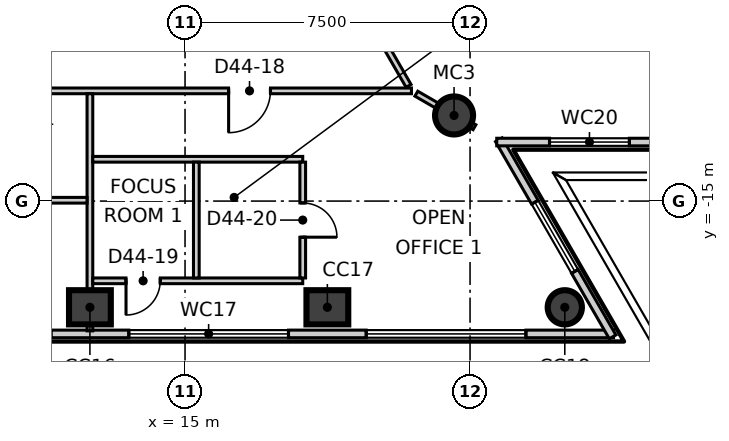
"""IFC4 building model, lengths in metres.
Left out: names, types, materials, properties, quantities, classifications, styles, units other than length and angle.
Written with IfcOpenShell. Run it as: python <this file> out.ifc"""

import sys

from ifc_helpers import new_model, si_unit, direction, frame, frame_2d, origin, origin_2d, place, context, subcontext, project, spatial, rectangle, circle, extrude, element, fill, save


model = new_model("IFC4")
c1 = context("Model", 3, precision=1e-05, world=origin(), true_north=direction((0.0, 1.0)))
c2 = subcontext(c1, "Body", "Model", "MODEL_VIEW")
j1 = project(units=[si_unit("LENGTHUNIT", "METRE"), si_unit("PLANEANGLEUNIT", "RADIAN")], contexts=[c1])
p1 = place(None, origin())
s1 = spatial("IfcSite", under=j1, at=p1, CompositionType="ELEMENT")
p2 = place(p1, origin())
s2 = spatial("IfcBuilding", under=s1, at=p2, CompositionType="ELEMENT")
p3 = place(p2, frame((0.0, 0.0, 191.3)))
s3 = spatial("IfcBuildingStorey", under=s2, at=p3, CompositionType="ELEMENT", Elevation=191.3)
for number, where, z_axis, x_axis in (
    (1, (12.497, -17.795, -0.3), (0.0, 0.0, 1.0), (1.0, 0.0, 0.0)),
    (2, (18.745, -17.795, -0.3), (0.0, 0.0, 1.0), (1.0, 0.0, 0.0)),
):
    element("IfcColumn", number, at=place(p3, frame(where, z_axis=z_axis, x_axis=x_axis)), inside=s3, PredefinedType="COLUMN", context=c2, shape_type="SweptSolid", body=[
        extrude(rectangle(XDim=1.1, YDim=0.9, at=origin_2d()), origin(), (0.0, 0.0, 1.0), 4.0),
    ])
p4 = place(p3, frame((24.993, -17.795, -0.3), z_axis=(0.0, 0.0, 1.0), x_axis=(1.0, 0.0, 0.0)))
e3 = element("IfcColumn", 3, at=p4, inside=s3, PredefinedType="COLUMN", context=c2, shape_type="SweptSolid", body=[
    extrude(circle(Radius=0.45, at=origin_2d()), origin(), (0.0, 0.0, 1.0), 4.0),
])
p5 = place(p3, frame((22.079, -12.747, -0.3), z_axis=(0.0, 0.0, 1.0), x_axis=(1.0, 0.0, 0.0)))
e4 = element("IfcColumn", 4, at=p5, inside=s3, PredefinedType="COLUMN", context=c2, shape_type="SweptSolid", body=[
    extrude(circle(Radius=0.5, at=origin_2d()), origin(), (0.0, 0.0, 1.0), 4.0),
])
p6 = place(p3, frame((-26.296, -18.495, 0.0), z_axis=(0.0, 0.0, 1.0), x_axis=(1.0, 0.0, 0.0)))
e5 = element("IfcWall", 5, at=p6, inside=s3, PredefinedType="ELEMENTEDWALL", context=c2, shape_type="SweptSolid", body=[
    extrude(rectangle(XDim=52.572, YDim=0.2, at=frame_2d((26.286, 0.0))), origin(), (0.0, 0.0, 1.0), 3.7),
])
p7 = place(p6, frame((2.327, 0.0, 0.9)))
e6 = element("IfcOpeningElement", 6, at=p7, cuts=e5, PredefinedType="OPENING", context=c2, shape_type="SweptSolid", body=[
    extrude(rectangle(XDim=4.2, YDim=2.5, at=frame_2d((2.1, 1.25))), frame((0.0, 0.11, 0.0), z_axis=(0.0, -1.0, 0.0), x_axis=(1.0, 0.0, 0.0)), (0.0, 0.0, 1.0), 0.22),
])
p8 = place(p6, frame((8.575, 0.0, 0.9)))
e7 = element("IfcOpeningElement", 7, at=p8, cuts=e5, PredefinedType="OPENING", context=c2, shape_type="SweptSolid", body=[
    extrude(rectangle(XDim=4.2, YDim=2.5, at=frame_2d((2.1, 1.25))), frame((0.0, 0.11, 0.0), z_axis=(0.0, -1.0, 0.0), x_axis=(1.0, 0.0, 0.0)), (0.0, 0.0, 1.0), 0.22),
])
p9 = place(p6, frame((14.824, 0.0, 0.9)))
e8 = element("IfcOpeningElement", 8, at=p9, cuts=e5, PredefinedType="OPENING", context=c2, shape_type="SweptSolid", body=[
    extrude(rectangle(XDim=4.2, YDim=2.5, at=frame_2d((2.1, 1.25))), frame((0.0, 0.11, 0.0), z_axis=(0.0, -1.0, 0.0), x_axis=(1.0, 0.0, 0.0)), (0.0, 0.0, 1.0), 0.22),
])
p10 = place(p6, frame((21.072, 0.0, 0.9)))
e9 = element("IfcOpeningElement", 9, at=p10, cuts=e5, PredefinedType="OPENING", context=c2, shape_type="SweptSolid", body=[
    extrude(rectangle(XDim=4.2, YDim=2.5, at=frame_2d((2.1, 1.25))), frame((0.0, 0.11, 0.0), z_axis=(0.0, -1.0, 0.0), x_axis=(1.0, 0.0, 0.0)), (0.0, 0.0, 1.0), 0.22),
])
p11 = place(p6, frame((27.32, 0.0, 0.9)))
e10 = element("IfcOpeningElement", 10, at=p11, cuts=e5, PredefinedType="OPENING", context=c2, shape_type="SweptSolid", body=[
    extrude(rectangle(XDim=4.2, YDim=2.5, at=frame_2d((2.1, 1.25))), frame((0.0, 0.11, 0.0), z_axis=(0.0, -1.0, 0.0), x_axis=(1.0, 0.0, 0.0)), (0.0, 0.0, 1.0), 0.22),
])
p12 = place(p6, frame((33.568, 0.0, 0.9)))
e11 = element("IfcOpeningElement", 11, at=p12, cuts=e5, PredefinedType="OPENING", context=c2, shape_type="SweptSolid", body=[
    extrude(rectangle(XDim=4.2, YDim=2.5, at=frame_2d((2.1, 1.25))), frame((0.0, 0.11, 0.0), z_axis=(0.0, -1.0, 0.0), x_axis=(1.0, 0.0, 0.0)), (0.0, 0.0, 1.0), 0.22),
])
p13 = place(p6, frame((39.817, 0.0, 0.9)))
e12 = element("IfcOpeningElement", 12, at=p13, cuts=e5, PredefinedType="OPENING", context=c2, shape_type="SweptSolid", body=[
    extrude(rectangle(XDim=4.2, YDim=2.5, at=frame_2d((2.1, 1.25))), frame((0.0, 0.11, 0.0), z_axis=(0.0, -1.0, 0.0), x_axis=(1.0, 0.0, 0.0)), (0.0, 0.0, 1.0), 0.22),
])
p14 = place(p6, frame((46.065, 0.0, 0.9)))
e13 = element("IfcOpeningElement", 13, at=p14, cuts=e5, PredefinedType="OPENING", context=c2, shape_type="SweptSolid", body=[
    extrude(rectangle(XDim=4.2, YDim=2.5, at=frame_2d((2.1, 1.25))), frame((0.0, 0.11, 0.0), z_axis=(0.0, -1.0, 0.0), x_axis=(1.0, 0.0, 0.0)), (0.0, 0.0, 1.0), 0.22),
])
p15 = place(p3, frame((26.251, -18.573, 0.0), z_axis=(0.0, 0.0, 1.0), x_axis=(-0.499896541353, 0.866085127423, 0.0)))
e14 = element("IfcWall", 14, at=p15, inside=s3, PredefinedType="ELEMENTEDWALL", context=c2, shape_type="SweptSolid", body=[
    extrude(rectangle(XDim=5.989, YDim=0.2, at=frame_2d((2.995, 0.0))), origin(), (0.0, 0.0, 1.0), 3.7),
])
p16 = place(p15, frame((1.99, 0.0, 0.9)))
e15 = element("IfcOpeningElement", 15, at=p16, cuts=e14, PredefinedType="OPENING", context=c2, shape_type="SweptSolid", body=[
    extrude(rectangle(XDim=2.1, YDim=2.5, at=frame_2d((1.05, 1.25))), frame((0.0, 0.11, 0.0), z_axis=(0.0, -1.0, 0.0), x_axis=(1.0, 0.0, 0.0)), (0.0, 0.0, 1.0), 0.22),
])
p17 = place(p3, frame((23.202, -13.447, 0.0), z_axis=(0.0, 0.0, 1.0), x_axis=(1.0, 0.0, 0.0)))
e16 = element("IfcWall", 16, at=p17, inside=s3, PredefinedType="ELEMENTEDWALL", context=c2, shape_type="SweptSolid", body=[
    extrude(rectangle(XDim=5.988, YDim=0.2, at=frame_2d((2.994, 0.0))), origin(), (0.0, 0.0, 1.0), 3.7),
])
p18 = place(p17, frame((1.39, 0.0, 0.9)))
e17 = element("IfcOpeningElement", 17, at=p18, cuts=e16, PredefinedType="OPENING", context=c2, shape_type="SweptSolid", body=[
    extrude(rectangle(XDim=2.1, YDim=2.5, at=frame_2d((1.05, 1.25))), frame((0.0, 0.11, 0.0), z_axis=(0.0, -1.0, 0.0), x_axis=(1.0, 0.0, 0.0)), (0.0, 0.0, 1.0), 0.22),
])
p19 = place(p3, frame((29.165, -13.525, 0.0), z_axis=(0.0, 0.0, 1.0), x_axis=(-0.500008941164, 0.86602024154, 0.0)))
e18 = element("IfcWall", 18, at=p19, inside=s3, PredefinedType="ELEMENTEDWALL", context=c2, shape_type="SweptSolid", body=[
    extrude(rectangle(XDim=52.571, YDim=0.2, at=frame_2d((26.286, 0.0))), origin(), (0.0, 0.0, 1.0), 3.7),
])
p20 = place(p19, frame((2.327, 0.0, 0.9)))
e19 = element("IfcOpeningElement", 19, at=p20, cuts=e18, PredefinedType="OPENING", context=c2, shape_type="SweptSolid", body=[
    extrude(rectangle(XDim=4.2, YDim=2.5, at=frame_2d((2.1, 1.25))), frame((0.0, 0.11, 0.0), z_axis=(0.0, -1.0, 0.0), x_axis=(1.0, 0.0, 0.0)), (0.0, 0.0, 1.0), 0.22),
])
p21 = place(p19, frame((8.575, 0.0, 0.9)))
e20 = element("IfcOpeningElement", 20, at=p21, cuts=e18, PredefinedType="OPENING", context=c2, shape_type="SweptSolid", body=[
    extrude(rectangle(XDim=4.2, YDim=2.5, at=frame_2d((2.1, 1.25))), frame((0.0, 0.11, 0.0), z_axis=(0.0, -1.0, 0.0), x_axis=(1.0, 0.0, 0.0)), (0.0, 0.0, 1.0), 0.22),
])
p22 = place(p19, frame((14.823, 0.0, 0.9)))
e21 = element("IfcOpeningElement", 21, at=p22, cuts=e18, PredefinedType="OPENING", context=c2, shape_type="SweptSolid", body=[
    extrude(rectangle(XDim=4.2, YDim=2.5, at=frame_2d((2.1, 1.25))), frame((0.0, 0.11, 0.0), z_axis=(0.0, -1.0, 0.0), x_axis=(1.0, 0.0, 0.0)), (0.0, 0.0, 1.0), 0.22),
])
p23 = place(p19, frame((21.072, 0.0, 0.9)))
e22 = element("IfcOpeningElement", 22, at=p23, cuts=e18, PredefinedType="OPENING", context=c2, shape_type="SweptSolid", body=[
    extrude(rectangle(XDim=4.2, YDim=2.5, at=frame_2d((2.1, 1.25))), frame((0.0, 0.11, 0.0), z_axis=(0.0, -1.0, 0.0), x_axis=(1.0, 0.0, 0.0)), (0.0, 0.0, 1.0), 0.22),
])
p24 = place(p19, frame((27.32, 0.0, 0.9)))
e23 = element("IfcOpeningElement", 23, at=p24, cuts=e18, PredefinedType="OPENING", context=c2, shape_type="SweptSolid", body=[
    extrude(rectangle(XDim=4.2, YDim=2.5, at=frame_2d((2.1, 1.25))), frame((0.0, 0.11, 0.0), z_axis=(0.0, -1.0, 0.0), x_axis=(1.0, 0.0, 0.0)), (0.0, 0.0, 1.0), 0.22),
])
p25 = place(p19, frame((33.568, 0.0, 0.9)))
e24 = element("IfcOpeningElement", 24, at=p25, cuts=e18, PredefinedType="OPENING", context=c2, shape_type="SweptSolid", body=[
    extrude(rectangle(XDim=4.2, YDim=2.5, at=frame_2d((2.1, 1.25))), frame((0.0, 0.11, 0.0), z_axis=(0.0, -1.0, 0.0), x_axis=(1.0, 0.0, 0.0)), (0.0, 0.0, 1.0), 0.22),
])
p26 = place(p19, frame((39.816, 0.0, 0.9)))
e25 = element("IfcOpeningElement", 25, at=p26, cuts=e18, PredefinedType="OPENING", context=c2, shape_type="SweptSolid", body=[
    extrude(rectangle(XDim=4.2, YDim=2.5, at=frame_2d((2.1, 1.25))), frame((0.0, 0.11, 0.0), z_axis=(0.0, -1.0, 0.0), x_axis=(1.0, 0.0, 0.0)), (0.0, 0.0, 1.0), 0.22),
])
p27 = place(p19, frame((46.064, 0.0, 0.9)))
e26 = element("IfcOpeningElement", 26, at=p27, cuts=e18, PredefinedType="OPENING", context=c2, shape_type="SweptSolid", body=[
    extrude(rectangle(XDim=4.2, YDim=2.5, at=frame_2d((2.1, 1.25))), frame((0.0, 0.11, 0.0), z_axis=(0.0, -1.0, 0.0), x_axis=(1.0, 0.0, 0.0)), (0.0, 0.0, 1.0), 0.22),
])
p28 = place(p3, frame((-20.808, -12.1, 0.0), z_axis=(0.0, 0.0, 1.0), x_axis=(1.0, 0.0, 0.0)))
e27 = element("IfcWall", 27, at=p28, inside=s3, PredefinedType="PARTITIONING", context=c2, shape_type="SweptSolid", body=[
    extrude(rectangle(XDim=41.766, YDim=0.15, at=frame_2d((20.883, 0.0))), origin(), (0.0, 0.0, 1.0), 3.7),
])
p29 = place(p28, frame((3.5, 0.0, 0.0)))
e28 = element("IfcOpeningElement", 28, at=p29, cuts=e27, PredefinedType="OPENING", context=c2, shape_type="SweptSolid", body=[
    extrude(rectangle(XDim=1.1, YDim=2.1, at=frame_2d((0.55, 1.05))), frame((0.0, 0.085, 0.0), z_axis=(0.0, -1.0, 0.0), x_axis=(1.0, 0.0, 0.0)), (0.0, 0.0, 1.0), 0.17),
])
p30 = place(p28, frame((18.362, 0.0, 0.0)))
e29 = element("IfcOpeningElement", 29, at=p30, cuts=e27, PredefinedType="OPENING", context=c2, shape_type="SweptSolid", body=[
    extrude(rectangle(XDim=1.1, YDim=2.1, at=frame_2d((0.55, 1.05))), frame((0.0, 0.085, 0.0), z_axis=(0.0, -1.0, 0.0), x_axis=(1.0, 0.0, 0.0)), (0.0, 0.0, 1.0), 0.17),
])
p31 = place(p28, frame((9.462, 0.0, 0.0)))
e30 = element("IfcOpeningElement", 30, at=p31, cuts=e27, PredefinedType="OPENING", context=c2, shape_type="SweptSolid", body=[
    extrude(rectangle(XDim=0.9, YDim=2.1, at=frame_2d((0.45, 1.05))), frame((0.0, 0.085, 0.0), z_axis=(0.0, -1.0, 0.0), x_axis=(1.0, 0.0, 0.0)), (0.0, 0.0, 1.0), 0.17),
])
p32 = place(p28, frame((12.662, 0.0, 0.0)))
e31 = element("IfcOpeningElement", 31, at=p32, cuts=e27, PredefinedType="OPENING", context=c2, shape_type="SweptSolid", body=[
    extrude(rectangle(XDim=0.9, YDim=2.1, at=frame_2d((0.45, 1.05))), frame((0.0, 0.085, 0.0), z_axis=(0.0, -1.0, 0.0), x_axis=(1.0, 0.0, 0.0)), (0.0, 0.0, 1.0), 0.17),
])
p33 = place(p28, frame((15.362, 0.0, 0.0)))
e32 = element("IfcOpeningElement", 32, at=p33, cuts=e27, PredefinedType="OPENING", context=c2, shape_type="SweptSolid", body=[
    extrude(rectangle(XDim=1.0, YDim=2.1, at=frame_2d((0.5, 1.05))), frame((0.0, 0.085, 0.0), z_axis=(0.0, -1.0, 0.0), x_axis=(1.0, 0.0, 0.0)), (0.0, 0.0, 1.0), 0.17),
])
p34 = place(p28, frame((26.458, 0.0, 0.0)))
e33 = element("IfcOpeningElement", 33, at=p34, cuts=e27, PredefinedType="OPENING", context=c2, shape_type="SweptSolid", body=[
    extrude(rectangle(XDim=1.1, YDim=2.1, at=frame_2d((0.55, 1.05))), frame((0.0, 0.085, 0.0), z_axis=(0.0, -1.0, 0.0), x_axis=(1.0, 0.0, 0.0)), (0.0, 0.0, 1.0), 0.17),
])
p35 = place(p28, frame((36.955, 0.0, 0.0)))
e34 = element("IfcOpeningElement", 34, at=p35, cuts=e27, PredefinedType="OPENING", context=c2, shape_type="SweptSolid", body=[
    extrude(rectangle(XDim=1.1, YDim=2.1, at=frame_2d((0.55, 1.05))), frame((0.0, 0.085, 0.0), z_axis=(0.0, -1.0, 0.0), x_axis=(1.0, 0.0, 0.0)), (0.0, 0.0, 1.0), 0.17),
])
p36 = place(p3, frame((21.087, -12.174, 0.0), z_axis=(0.0, 0.0, 1.0), x_axis=(0.866022094817, -0.500005731256, 0.0)))
e35 = element("IfcWall", 35, at=p36, inside=s3, PredefinedType="PARTITIONING", context=c2, shape_type="SweptSolid", body=[
    extrude(rectangle(XDim=1.766, YDim=0.15, at=frame_2d((0.883, 0.0))), origin(), (0.0, 0.0, 1.0), 3.2),
])
p37 = place(p3, frame((0.075, 24.07, 0.0), z_axis=(0.0, 0.0, 1.0), x_axis=(0.49999939571, -0.866025752671, 0.0)))
e36 = element("IfcWall", 36, at=p37, inside=s3, PredefinedType="PARTITIONING", context=c2, shape_type="SweptSolid", body=[
    extrude(rectangle(XDim=41.614, YDim=0.15, at=frame_2d((20.807, 0.0))), origin(), (0.0, 0.0, 1.0), 3.7),
])
p38 = place(p37, frame((37.015, 0.0, 0.0)))
e37 = element("IfcOpeningElement", 37, at=p38, cuts=e36, PredefinedType="OPENING", context=c2, shape_type="SweptSolid", body=[
    extrude(rectangle(XDim=1.1, YDim=2.1, at=frame_2d((0.55, 1.05))), frame((0.0, 0.085, 0.0), z_axis=(0.0, -1.0, 0.0), x_axis=(1.0, 0.0, 0.0)), (0.0, 0.0, 1.0), 0.17),
])
p39 = place(p37, frame((25.154, 0.0, 0.0)))
e38 = element("IfcOpeningElement", 38, at=p39, cuts=e36, PredefinedType="OPENING", context=c2, shape_type="SweptSolid", body=[
    extrude(rectangle(XDim=1.0, YDim=2.1, at=frame_2d((0.5, 1.05))), frame((0.0, 0.085, 0.0), z_axis=(0.0, -1.0, 0.0), x_axis=(1.0, 0.0, 0.0)), (0.0, 0.0, 1.0), 0.17),
])
p40 = place(p37, frame((31.454, 0.0, 0.0)))
e39 = element("IfcOpeningElement", 39, at=p40, cuts=e36, PredefinedType="OPENING", context=c2, shape_type="SweptSolid", body=[
    extrude(rectangle(XDim=0.9, YDim=2.1, at=frame_2d((0.45, 1.05))), frame((0.0, 0.085, 0.0), z_axis=(0.0, -1.0, 0.0), x_axis=(1.0, 0.0, 0.0)), (0.0, 0.0, 1.0), 0.17),
])
p41 = place(p37, frame((17.157, 0.0, 0.0)))
e40 = element("IfcOpeningElement", 40, at=p41, cuts=e36, PredefinedType="OPENING", context=c2, shape_type="SweptSolid", body=[
    extrude(rectangle(XDim=1.0, YDim=2.1, at=frame_2d((0.5, 1.05))), frame((0.0, 0.085, 0.0), z_axis=(0.0, -1.0, 0.0), x_axis=(1.0, 0.0, 0.0)), (0.0, 0.0, 1.0), 0.17),
])
p42 = place(p37, frame((6.609, 0.0, 0.0)))
e41 = element("IfcOpeningElement", 41, at=p42, cuts=e36, PredefinedType="OPENING", context=c2, shape_type="SweptSolid", body=[
    extrude(rectangle(XDim=1.1, YDim=2.1, at=frame_2d((0.55, 1.05))), frame((0.0, 0.085, 0.0), z_axis=(0.0, -1.0, 0.0), x_axis=(1.0, 0.0, 0.0)), (0.0, 0.0, 1.0), 0.17),
])
p43 = place(p3, frame((12.497, -18.415, 0.0), z_axis=(0.0, 0.0, 1.0), x_axis=(0.0, 1.0, 0.0)))
e42 = element("IfcWall", 42, at=p43, inside=s3, PredefinedType="PARTITIONING", context=c2, shape_type="SweptSolid", body=[
    extrude(rectangle(XDim=6.24, YDim=0.15, at=frame_2d((3.12, 0.0))), origin(), (0.0, 0.0, 1.0), 3.7),
])
p44 = place(p3, frame((0.075, -14.978, 0.0), z_axis=(0.0, 0.0, 1.0), x_axis=(1.0, 0.0, 0.0)))
e43 = element("IfcWall", 43, at=p44, inside=s3, PredefinedType="PARTITIONING", context=c2, shape_type="SweptSolid", body=[
    extrude(rectangle(XDim=12.347, YDim=0.15, at=frame_2d((6.174, 0.0))), origin(), (0.0, 0.0, 1.0), 3.7),
])
p45 = place(p44, frame((5.675, 0.0, 0.0)))
e44 = element("IfcOpeningElement", 44, at=p45, cuts=e43, PredefinedType="OPENING", context=c2, shape_type="SweptSolid", body=[
    extrude(rectangle(XDim=1.0, YDim=2.1, at=frame_2d((0.5, 1.05))), frame((0.0, 0.085, 0.0), z_axis=(0.0, -1.0, 0.0), x_axis=(1.0, 0.0, 0.0)), (0.0, 0.0, 1.0), 0.17),
])
p46 = place(p3, frame((12.572, -17.098, 0.0), z_axis=(0.0, 0.0, 1.0), x_axis=(1.0, 0.0, 0.0)))
e45 = element("IfcWall", 45, at=p46, inside=s3, PredefinedType="PARTITIONING", context=c2, shape_type="SweptSolid", body=[
    extrude(rectangle(XDim=5.525, YDim=0.15, at=frame_2d((2.762, 0.0))), origin(), (0.0, 0.0, 1.0), 3.7),
])
p47 = place(p46, frame((0.875, 0.0, 0.0)))
e46 = element("IfcOpeningElement", 46, at=p47, cuts=e45, PredefinedType="OPENING", context=c2, shape_type="SweptSolid", body=[
    extrude(rectangle(XDim=0.9, YDim=2.1, at=frame_2d((0.45, 1.05))), frame((0.0, 0.085, 0.0), z_axis=(0.0, -1.0, 0.0), x_axis=(1.0, 0.0, 0.0)), (0.0, 0.0, 1.0), 0.17),
])
p48 = place(p3, frame((12.572, -13.9, 0.0), z_axis=(0.0, 0.0, 1.0), x_axis=(1.0, 0.0, 0.0)))
e47 = element("IfcWall", 47, at=p48, inside=s3, PredefinedType="PARTITIONING", context=c2, shape_type="SweptSolid", body=[
    extrude(rectangle(XDim=5.525, YDim=0.15, at=frame_2d((2.762, 0.0))), origin(), (0.0, 0.0, 1.0), 3.7),
])
p49 = place(p3, frame((18.097, -17.023, 0.0), z_axis=(0.0, 0.0, 1.0), x_axis=(0.0, 1.0, 0.0)))
e48 = element("IfcWall", 48, at=p49, inside=s3, PredefinedType="PARTITIONING", context=c2, shape_type="SweptSolid", body=[
    extrude(rectangle(XDim=3.048, YDim=0.15, at=frame_2d((1.524, 0.0))), origin(), (0.0, 0.0, 1.0), 3.7),
])
p50 = place(p49, frame((1.073, 0.0, 0.0)))
e49 = element("IfcOpeningElement", 49, at=p50, cuts=e48, PredefinedType="OPENING", context=c2, shape_type="SweptSolid", body=[
    extrude(rectangle(XDim=0.9, YDim=2.1, at=frame_2d((0.45, 1.05))), frame((0.0, 0.085, 0.0), z_axis=(0.0, -1.0, 0.0), x_axis=(1.0, 0.0, 0.0)), (0.0, 0.0, 1.0), 0.17),
])
p51 = place(p3, frame((15.297, -17.023, 0.0), z_axis=(0.0, 0.0, 1.0), x_axis=(0.0, 1.0, 0.0)))
e50 = element("IfcWall", 50, at=p51, inside=s3, PredefinedType="PARTITIONING", context=c2, shape_type="SweptSolid", body=[
    extrude(rectangle(XDim=3.048, YDim=0.15, at=frame_2d((1.524, 0.0))), origin(), (0.0, 0.0, 1.0), 3.7),
])
p52 = place(p13, origin())
e51 = element("IfcWindow", 51, at=p52, inside=s3, PartitioningType="SINGLE_PANEL", PredefinedType="WINDOW", context=c2, shape_type="SweptSolid", body=[
    extrude(rectangle(XDim=4.2, YDim=2.5, at=frame_2d((2.1, 1.25))), frame((0.0, 0.03, 0.0), z_axis=(0.0, -1.0, 0.0), x_axis=(1.0, 0.0, 0.0)), (0.0, 0.0, 1.0), 0.06),
])
fill(e12, e51)
p53 = place(p14, origin())
e52 = element("IfcWindow", 52, at=p53, inside=s3, PartitioningType="SINGLE_PANEL", PredefinedType="WINDOW", context=c2, shape_type="SweptSolid", body=[
    extrude(rectangle(XDim=4.2, YDim=2.5, at=frame_2d((2.1, 1.25))), frame((0.0, 0.03, 0.0), z_axis=(0.0, -1.0, 0.0), x_axis=(1.0, 0.0, 0.0)), (0.0, 0.0, 1.0), 0.06),
])
fill(e13, e52)
p54 = place(p16, origin())
e53 = element("IfcWindow", 53, at=p54, inside=s3, PartitioningType="SINGLE_PANEL", PredefinedType="WINDOW", context=c2, shape_type="SweptSolid", body=[
    extrude(rectangle(XDim=2.1, YDim=2.5, at=frame_2d((1.05, 1.25))), frame((0.0, 0.03, 0.0), z_axis=(0.0, -1.0, 0.0), x_axis=(1.0, 0.0, 0.0)), (0.0, 0.0, 1.0), 0.06),
])
fill(e15, e53)
p55 = place(p18, origin())
e54 = element("IfcWindow", 54, at=p55, inside=s3, PartitioningType="SINGLE_PANEL", PredefinedType="WINDOW", context=c2, shape_type="SweptSolid", body=[
    extrude(rectangle(XDim=2.1, YDim=2.5, at=frame_2d((1.05, 1.25))), frame((0.0, 0.03, 0.0), z_axis=(0.0, -1.0, 0.0), x_axis=(1.0, 0.0, 0.0)), (0.0, 0.0, 1.0), 0.06),
])
fill(e17, e54)
p56 = place(p20, origin())
e55 = element("IfcWindow", 55, at=p56, inside=s3, PartitioningType="SINGLE_PANEL", PredefinedType="WINDOW", context=c2, shape_type="SweptSolid", body=[
    extrude(rectangle(XDim=4.2, YDim=2.5, at=frame_2d((2.1, 1.25))), frame((0.0, 0.03, 0.0), z_axis=(0.0, -1.0, 0.0), x_axis=(1.0, 0.0, 0.0)), (0.0, 0.0, 1.0), 0.06),
])
fill(e19, e55)
p57 = place(p35, origin())
e56 = element("IfcDoor", 56, at=p57, inside=s3, OperationType="SINGLE_SWING_LEFT", PredefinedType="DOOR", context=c2, shape_type="SweptSolid", body=[
    extrude(rectangle(XDim=1.1, YDim=2.1, at=frame_2d((0.55, 1.05))), frame((0.0, 0.025, 0.0), z_axis=(0.0, -1.0, 0.0), x_axis=(1.0, 0.0, 0.0)), (0.0, 0.0, 1.0), 0.05),
])
fill(e34, e56)
p58 = place(p47, origin())
e57 = element("IfcDoor", 57, at=p58, inside=s3, OperationType="SINGLE_SWING_LEFT", PredefinedType="DOOR", context=c2, shape_type="SweptSolid", body=[
    extrude(rectangle(XDim=0.9, YDim=2.1, at=frame_2d((0.45, 1.05))), frame((0.0, 0.025, 0.0), z_axis=(0.0, -1.0, 0.0), x_axis=(1.0, 0.0, 0.0)), (0.0, 0.0, 1.0), 0.05),
])
fill(e46, e57)
p59 = place(p50, origin())
e58 = element("IfcDoor", 58, at=p59, inside=s3, OperationType="SINGLE_SWING_LEFT", PredefinedType="DOOR", context=c2, shape_type="SweptSolid", body=[
    extrude(rectangle(XDim=0.9, YDim=2.1, at=frame_2d((0.45, 1.05))), frame((0.0, 0.025, 0.0), z_axis=(0.0, -1.0, 0.0), x_axis=(1.0, 0.0, 0.0)), (0.0, 0.0, 1.0), 0.05),
])
fill(e49, e58)
save(model, sys.argv[1])
